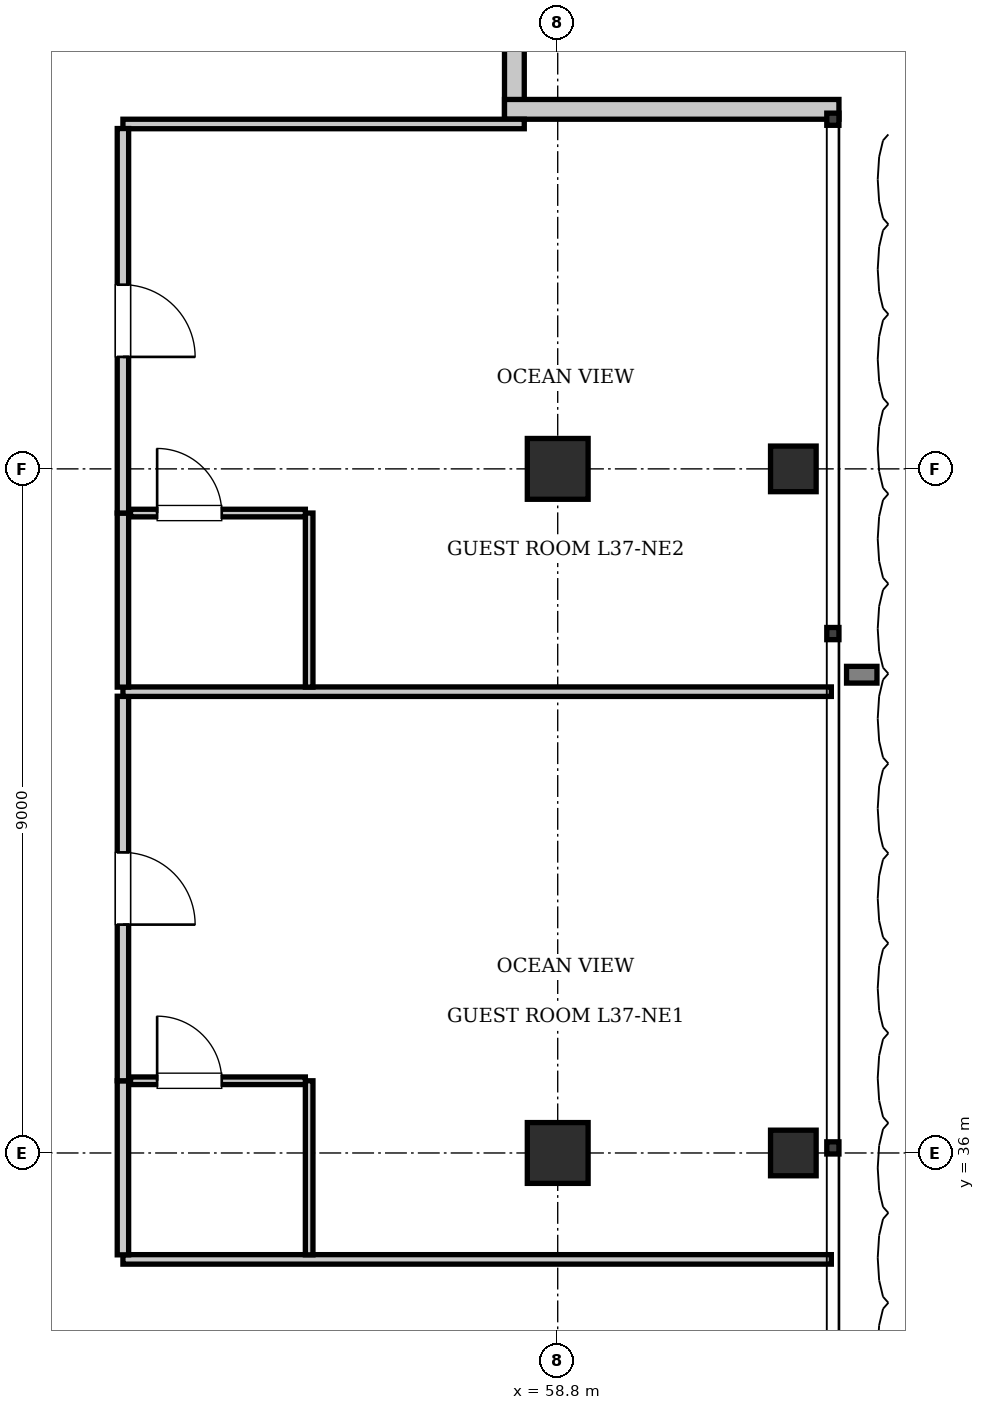
"""IFC4 building model, lengths in metres.
Left out: names, types, materials, properties, quantities, classifications, styles, units other than length and angle.
Written with IfcOpenShell. Run it as: python <this file> out.ifc"""

import sys

from ifc_helpers import new_model, si_unit, direction, frame, frame_2d, origin, origin_2d, place, context, subcontext, project, spatial, rectangle, i_section, extrude, element, fill, save


model = new_model("IFC4")
c1 = context("Model", 3, precision=1e-05, world=origin(), true_north=direction((0.0, 1.0)))
c2 = subcontext(c1, "Body", "Model", "MODEL_VIEW")
j1 = project(units=[si_unit("LENGTHUNIT", "METRE"), si_unit("PLANEANGLEUNIT", "RADIAN")], contexts=[c1])
p1 = place(None, origin())
s1 = spatial("IfcSite", under=j1, at=p1, CompositionType="ELEMENT")
p2 = place(p1, origin())
s2 = spatial("IfcBuilding", under=s1, at=p2, CompositionType="ELEMENT")
p3 = place(p2, frame((0.0, 0.0, 154.35)))
s3 = spatial("IfcBuildingStorey", under=s2, at=p3, CompositionType="ELEMENT", Elevation=154.35)
for number, where, z_axis, x_axis in (
    (1, (58.8, 36.0, 0.0), (0.0, 0.0, 1.0), (1.0, 0.0, 0.0)),
    (2, (58.8, 45.0, 0.0), (0.0, 0.0, 1.0), (1.0, 0.0, 0.0)),
):
    element("IfcColumn", number, at=place(p3, frame(where, z_axis=z_axis, x_axis=x_axis)), inside=s3, PredefinedType="COLUMN", context=c2, shape_type="SweptSolid", body=[
        extrude(rectangle(XDim=0.8, YDim=0.8, at=origin_2d()), origin(), (0.0, 0.0, 1.0), 3.85),
    ])
for number, where, z_axis, x_axis in (
    (3, (61.9, 36.0, 0.0), (0.0, 0.0, 1.0), (1.0, 0.0, 0.0)),
    (4, (61.9, 45.0, 0.0), (0.0, 0.0, 1.0), (1.0, 0.0, 0.0)),
):
    element("IfcColumn", number, at=place(p3, frame(where, z_axis=z_axis, x_axis=x_axis)), inside=s3, PredefinedType="COLUMN", context=c2, shape_type="SweptSolid", body=[
        extrude(i_section(OverallWidth=0.6, OverallDepth=0.6, WebThickness=0.025, FlangeThickness=0.038, at=origin_2d()), origin(), (0.0, 0.0, 1.0), 3.85),
    ])
for number, where, z_axis, x_axis in (
    (5, (58.23, 54.0, 0.0), (0.0, 0.0, 1.0), (0.0, -1.0, 0.0)),
    (6, (58.1, 49.73, 0.0), (0.0, 0.0, 1.0), (1.0, 0.0, 0.0)),
):
    element("IfcWall", number, at=place(p3, frame(where, z_axis=z_axis, x_axis=x_axis)), inside=s3, PredefinedType="SOLIDWALL", context=c2, shape_type="SweptSolid", body=[
        extrude(rectangle(XDim=4.4, YDim=0.26, at=frame_2d((2.2, 0.0))), origin(), (0.0, 0.0, 1.0), 3.61),
    ])
p4 = place(p3, frame((53.08, 34.6, 0.0), z_axis=(0.0, 0.0, 1.0), x_axis=(1.0, 0.0, 0.0)))
e7 = element("IfcWall", 7, at=p4, inside=s3, PredefinedType="PARTITIONING", context=c2, shape_type="SweptSolid", body=[
    extrude(rectangle(XDim=9.32, YDim=0.125, at=frame_2d((4.66, 0.0))), origin(), (0.0, 0.0, 1.0), 3.61),
])
p5 = place(p3, frame((53.08, 49.538, 0.0), z_axis=(0.0, 0.0, 1.0), x_axis=(1.0, 0.0, 0.0)))
e8 = element("IfcWall", 8, at=p5, inside=s3, PredefinedType="PARTITIONING", context=c2, shape_type="SweptSolid", body=[
    extrude(rectangle(XDim=5.28, YDim=0.125, at=frame_2d((2.64, 0.0))), origin(), (0.0, 0.0, 1.0), 3.61),
])
p6 = place(p3, frame((53.08, 34.66, 0.0), z_axis=(0.0, 0.0, 1.0), x_axis=(0.0, 1.0, 0.0)))
e9 = element("IfcWall", 9, at=p6, inside=s3, PredefinedType="PARTITIONING", context=c2, shape_type="SweptSolid", body=[
    extrude(rectangle(XDim=2.29, YDim=0.15, at=frame_2d((1.145, 0.0))), origin(), (0.0, 0.0, 1.0), 3.61),
])
p7 = place(p3, frame((53.08, 36.95, 0.0), z_axis=(0.0, 0.0, 1.0), x_axis=(0.0, 1.0, 0.0)))
e10 = element("IfcWall", 10, at=p7, inside=s3, PredefinedType="PARTITIONING", context=c2, shape_type="SweptSolid", body=[
    extrude(rectangle(XDim=5.059, YDim=0.15, at=frame_2d((2.529, 0.0))), origin(), (0.0, 0.0, 1.0), 3.61),
])
p8 = place(p7, frame((2.054, 0.0, 0.0)))
e11 = element("IfcOpeningElement", 11, at=p8, cuts=e10, PredefinedType="OPENING", context=c2, shape_type="SweptSolid", body=[
    extrude(rectangle(XDim=0.95, YDim=2.15, at=frame_2d((0.475, 1.075))), frame((0.0, 0.085, 0.0), z_axis=(0.0, -1.0, 0.0), x_axis=(1.0, 0.0, 0.0)), (0.0, 0.0, 1.0), 0.17),
])
p9 = place(p3, frame((55.53, 34.66, 0.0), z_axis=(0.0, 0.0, 1.0), x_axis=(0.0, 1.0, 0.0)))
e12 = element("IfcWall", 12, at=p9, inside=s3, PredefinedType="PARTITIONING", context=c2, shape_type="SweptSolid", body=[
    extrude(rectangle(XDim=2.29, YDim=0.1, at=frame_2d((1.145, 0.0))), origin(), (0.0, 0.0, 1.0), 3.61),
])
p10 = place(p3, frame((53.18, 36.95, 0.0), z_axis=(0.0, 0.0, 1.0), x_axis=(1.0, 0.0, 0.0)))
e13 = element("IfcWall", 13, at=p10, inside=s3, PredefinedType="PARTITIONING", context=c2, shape_type="SweptSolid", body=[
    extrude(rectangle(XDim=2.3, YDim=0.1, at=frame_2d((1.15, 0.0))), origin(), (0.0, 0.0, 1.0), 3.61),
])
p11 = place(p10, frame((0.35, 0.0, 0.0)))
e14 = element("IfcOpeningElement", 14, at=p11, cuts=e13, PredefinedType="OPENING", context=c2, shape_type="SweptSolid", body=[
    extrude(rectangle(XDim=0.85, YDim=2.1, at=frame_2d((0.425, 1.05))), frame((0.0, 0.06, 0.0), z_axis=(0.0, -1.0, 0.0), x_axis=(1.0, 0.0, 0.0)), (0.0, 0.0, 1.0), 0.12),
])
p12 = place(p3, frame((53.08, 42.069, 0.0), z_axis=(0.0, 0.0, 1.0), x_axis=(1.0, 0.0, 0.0)))
e15 = element("IfcWall", 15, at=p12, inside=s3, PredefinedType="PARTITIONING", context=c2, shape_type="SweptSolid", body=[
    extrude(rectangle(XDim=9.32, YDim=0.125, at=frame_2d((4.66, 0.0))), origin(), (0.0, 0.0, 1.0), 3.61),
])
p13 = place(p3, frame((53.08, 42.129, 0.0), z_axis=(0.0, 0.0, 1.0), x_axis=(0.0, 1.0, 0.0)))
e16 = element("IfcWall", 16, at=p13, inside=s3, PredefinedType="PARTITIONING", context=c2, shape_type="SweptSolid", body=[
    extrude(rectangle(XDim=2.29, YDim=0.15, at=frame_2d((1.145, 0.0))), origin(), (0.0, 0.0, 1.0), 3.61),
])
p14 = place(p3, frame((53.08, 44.419, 0.0), z_axis=(0.0, 0.0, 1.0), x_axis=(0.0, 1.0, 0.0)))
e17 = element("IfcWall", 17, at=p14, inside=s3, PredefinedType="PARTITIONING", context=c2, shape_type="SweptSolid", body=[
    extrude(rectangle(XDim=5.059, YDim=0.15, at=frame_2d((2.529, 0.0))), origin(), (0.0, 0.0, 1.0), 3.61),
])
p15 = place(p14, frame((2.054, 0.0, 0.0)))
e18 = element("IfcOpeningElement", 18, at=p15, cuts=e17, PredefinedType="OPENING", context=c2, shape_type="SweptSolid", body=[
    extrude(rectangle(XDim=0.95, YDim=2.15, at=frame_2d((0.475, 1.075))), frame((0.0, 0.085, 0.0), z_axis=(0.0, -1.0, 0.0), x_axis=(1.0, 0.0, 0.0)), (0.0, 0.0, 1.0), 0.17),
])
p16 = place(p3, frame((55.53, 42.129, 0.0), z_axis=(0.0, 0.0, 1.0), x_axis=(0.0, 1.0, 0.0)))
e19 = element("IfcWall", 19, at=p16, inside=s3, PredefinedType="PARTITIONING", context=c2, shape_type="SweptSolid", body=[
    extrude(rectangle(XDim=2.29, YDim=0.1, at=frame_2d((1.145, 0.0))), origin(), (0.0, 0.0, 1.0), 3.61),
])
p17 = place(p3, frame((53.18, 44.419, 0.0), z_axis=(0.0, 0.0, 1.0), x_axis=(1.0, 0.0, 0.0)))
e20 = element("IfcWall", 20, at=p17, inside=s3, PredefinedType="PARTITIONING", context=c2, shape_type="SweptSolid", body=[
    extrude(rectangle(XDim=2.3, YDim=0.1, at=frame_2d((1.15, 0.0))), origin(), (0.0, 0.0, 1.0), 3.61),
])
p18 = place(p17, frame((0.35, 0.0, 0.0)))
e21 = element("IfcOpeningElement", 21, at=p18, cuts=e20, PredefinedType="OPENING", context=c2, shape_type="SweptSolid", body=[
    extrude(rectangle(XDim=0.85, YDim=2.1, at=frame_2d((0.425, 1.05))), frame((0.0, 0.06, 0.0), z_axis=(0.0, -1.0, 0.0), x_axis=(1.0, 0.0, 0.0)), (0.0, 0.0, 1.0), 0.12),
])
p19 = place(p11, origin())
e22 = element("IfcDoor", 22, at=p19, inside=s3, OperationType="SINGLE_SWING_LEFT", PredefinedType="DOOR", context=c2, shape_type="SweptSolid", body=[
    extrude(rectangle(XDim=0.85, YDim=2.1, at=frame_2d((0.425, 1.05))), frame((0.0, 0.025, 0.0), z_axis=(0.0, -1.0, 0.0), x_axis=(1.0, 0.0, 0.0)), (0.0, 0.0, 1.0), 0.05),
])
fill(e14, e22)
p20 = place(p8, frame((0.95, 0.0, 0.0), z_axis=(0.0, 0.0, 1.0), x_axis=(-1.0, 0.0, 0.0)))
e23 = element("IfcDoor", 23, at=p20, inside=s3, OperationType="SINGLE_SWING_RIGHT", PredefinedType="DOOR", context=c2, shape_type="SweptSolid", body=[
    extrude(rectangle(XDim=0.95, YDim=2.15, at=frame_2d((0.475, 1.075))), frame((0.0, 0.025, 0.0), z_axis=(0.0, -1.0, 0.0), x_axis=(1.0, 0.0, 0.0)), (0.0, 0.0, 1.0), 0.05),
])
fill(e11, e23)
p21 = place(p18, origin())
e24 = element("IfcDoor", 24, at=p21, inside=s3, OperationType="SINGLE_SWING_LEFT", PredefinedType="DOOR", context=c2, shape_type="SweptSolid", body=[
    extrude(rectangle(XDim=0.85, YDim=2.1, at=frame_2d((0.425, 1.05))), frame((0.0, 0.025, 0.0), z_axis=(0.0, -1.0, 0.0), x_axis=(1.0, 0.0, 0.0)), (0.0, 0.0, 1.0), 0.05),
])
fill(e21, e24)
p22 = place(p15, frame((0.95, 0.0, 0.0), z_axis=(0.0, 0.0, 1.0), x_axis=(-1.0, 0.0, 0.0)))
e25 = element("IfcDoor", 25, at=p22, inside=s3, OperationType="SINGLE_SWING_RIGHT", PredefinedType="DOOR", context=c2, shape_type="SweptSolid", body=[
    extrude(rectangle(XDim=0.95, YDim=2.15, at=frame_2d((0.475, 1.075))), frame((0.0, 0.025, 0.0), z_axis=(0.0, -1.0, 0.0), x_axis=(1.0, 0.0, 0.0)), (0.0, 0.0, 1.0), 0.05),
])
fill(e18, e25)
save(model, sys.argv[1])
